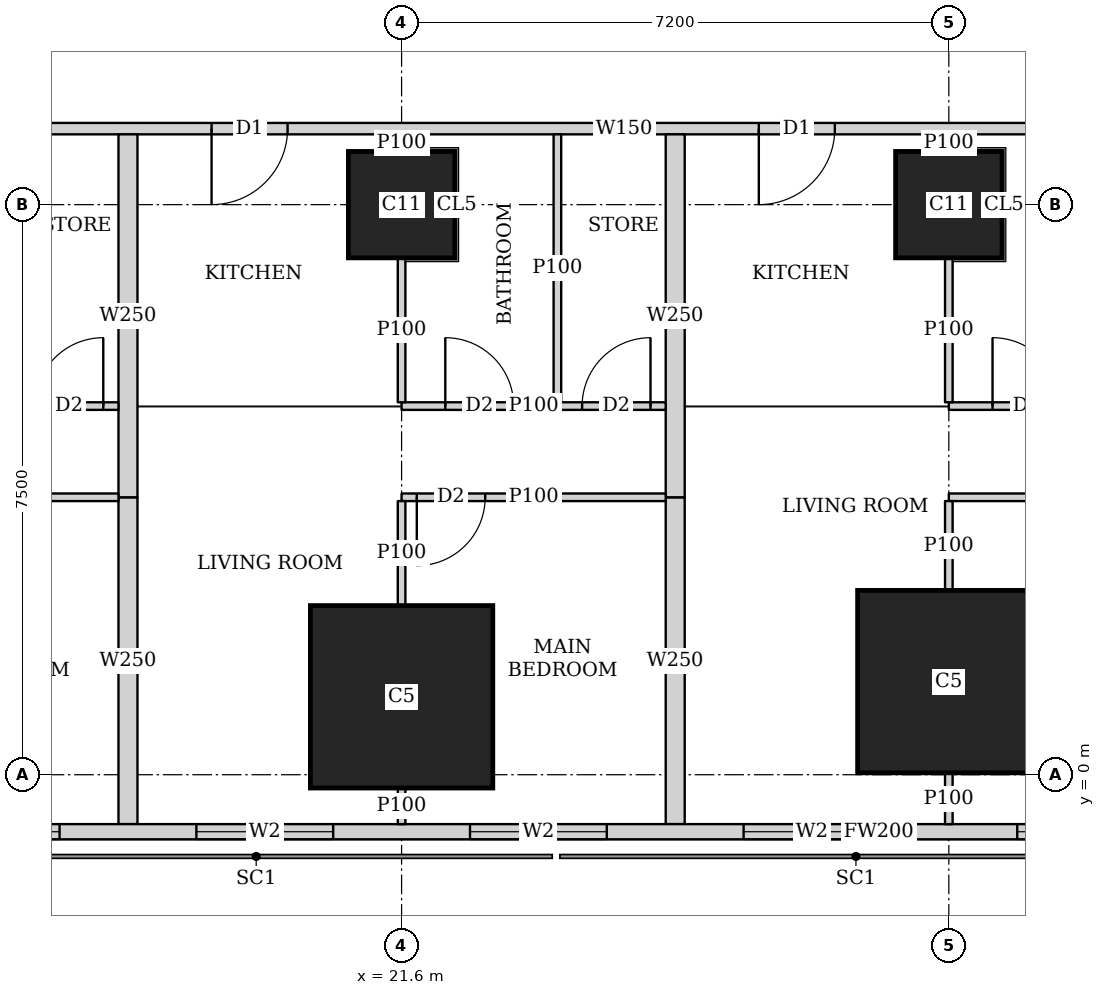
"""IFC4 building model, lengths in metres.
Left out: names, types, materials, properties, quantities, classifications, styles, units other than length and angle.
Written with IfcOpenShell. Run it as: python <this file> out.ifc"""

import sys

from ifc_helpers import new_model, si_unit, direction, frame, frame_2d, origin, origin_2d, place, context, subcontext, project, spatial, rectangle, extrude, element, fill, save


model = new_model("IFC4")
c1 = context("Model", 3, precision=1e-05, world=origin(), true_north=direction((0.0, 1.0)))
c2 = subcontext(c1, "Body", "Model", "MODEL_VIEW")
j1 = project(units=[si_unit("LENGTHUNIT", "METRE"), si_unit("PLANEANGLEUNIT", "RADIAN")], contexts=[c1])
p1 = place(None, origin())
s1 = spatial("IfcSite", under=j1, at=p1, CompositionType="ELEMENT")
p2 = place(p1, origin())
s2 = spatial("IfcBuilding", under=s1, at=p2, CompositionType="ELEMENT")
p3 = place(p2, frame((0.0, 0.0, 212.45)))
s3 = spatial("IfcBuildingStorey", under=s2, at=p3, CompositionType="ELEMENT", Elevation=212.45)
for number, where, z_axis, x_axis in (
    (1, (21.6, 1.025, 0.0), (0.0, 0.0, 1.0), (1.0, 0.0, 0.0)),
    (2, (28.8, 1.225, 0.0), (0.0, 0.0, 1.0), (1.0, 0.0, 0.0)),
):
    element("IfcColumn", number, at=place(p3, frame(where, z_axis=z_axis, x_axis=x_axis)), inside=s3, PredefinedType="COLUMN", context=c2, shape_type="SweptSolid", body=[
        extrude(rectangle(XDim=2.4, YDim=2.4, at=origin_2d()), origin(), (0.0, 0.0, 1.0), 3.75),
    ])
for number, where, z_axis, x_axis in (
    (3, (21.6, 7.5, 0.0), (0.0, 0.0, 1.0), (1.0, 0.0, 0.0)),
    (4, (28.8, 7.5, 0.0), (0.0, 0.0, 1.0), (1.0, 0.0, 0.0)),
):
    element("IfcColumn", number, at=place(p3, frame(where, z_axis=z_axis, x_axis=x_axis)), inside=s3, PredefinedType="COLUMN", context=c2, shape_type="SweptSolid", body=[
        extrude(rectangle(XDim=1.4, YDim=1.4, at=origin_2d()), origin(), (0.0, 0.0, 1.0), 3.75),
    ])
p4 = place(p3, frame((7.363, -0.75, 0.0), z_axis=(0.0, 0.0, 1.0), x_axis=(1.0, 0.0, 0.0)))
e5 = element("IfcWall", 5, at=p4, inside=s3, PredefinedType="SOLIDWALL", context=c2, shape_type="SweptSolid", body=[
    extrude(rectangle(XDim=40.428, YDim=0.2, at=frame_2d((20.214, 0.0))), origin(), (0.0, 0.0, 1.0), 3.5),
])
p5 = place(p4, frame((2.319, 0.0, 0.9)))
e6 = element("IfcOpeningElement", 6, at=p5, cuts=e5, PredefinedType="OPENING", context=c2, shape_type="SweptSolid", body=[
    extrude(rectangle(XDim=2.4, YDim=1.5, at=frame_2d((1.2, 0.75))), frame((0.0, 0.11, 0.0), z_axis=(0.0, -1.0, 0.0), x_axis=(1.0, 0.0, 0.0)), (0.0, 0.0, 1.0), 0.22),
])
p6 = place(p4, frame((7.937, 0.0, 0.9)))
e7 = element("IfcOpeningElement", 7, at=p6, cuts=e5, PredefinedType="OPENING", context=c2, shape_type="SweptSolid", body=[
    extrude(rectangle(XDim=1.8, YDim=1.5, at=frame_2d((0.9, 0.75))), frame((0.0, 0.11, 0.0), z_axis=(0.0, -1.0, 0.0), x_axis=(1.0, 0.0, 0.0)), (0.0, 0.0, 1.0), 0.22),
])
p7 = place(p4, frame((11.537, 0.0, 0.9)))
e8 = element("IfcOpeningElement", 8, at=p7, cuts=e5, PredefinedType="OPENING", context=c2, shape_type="SweptSolid", body=[
    extrude(rectangle(XDim=1.8, YDim=1.5, at=frame_2d((0.9, 0.75))), frame((0.0, 0.11, 0.0), z_axis=(0.0, -1.0, 0.0), x_axis=(1.0, 0.0, 0.0)), (0.0, 0.0, 1.0), 0.22),
])
p8 = place(p4, frame((15.137, 0.0, 0.9)))
e9 = element("IfcOpeningElement", 9, at=p8, cuts=e5, PredefinedType="OPENING", context=c2, shape_type="SweptSolid", body=[
    extrude(rectangle(XDim=1.8, YDim=1.5, at=frame_2d((0.9, 0.75))), frame((0.0, 0.11, 0.0), z_axis=(0.0, -1.0, 0.0), x_axis=(1.0, 0.0, 0.0)), (0.0, 0.0, 1.0), 0.22),
])
p9 = place(p4, frame((18.737, 0.0, 0.9)))
e10 = element("IfcOpeningElement", 10, at=p9, cuts=e5, PredefinedType="OPENING", context=c2, shape_type="SweptSolid", body=[
    extrude(rectangle(XDim=1.8, YDim=1.5, at=frame_2d((0.9, 0.75))), frame((0.0, 0.11, 0.0), z_axis=(0.0, -1.0, 0.0), x_axis=(1.0, 0.0, 0.0)), (0.0, 0.0, 1.0), 0.22),
])
p10 = place(p4, frame((22.337, 0.0, 0.9)))
e11 = element("IfcOpeningElement", 11, at=p10, cuts=e5, PredefinedType="OPENING", context=c2, shape_type="SweptSolid", body=[
    extrude(rectangle(XDim=1.8, YDim=1.5, at=frame_2d((0.9, 0.75))), frame((0.0, 0.11, 0.0), z_axis=(0.0, -1.0, 0.0), x_axis=(1.0, 0.0, 0.0)), (0.0, 0.0, 1.0), 0.22),
])
p11 = place(p4, frame((25.937, 0.0, 0.9)))
e12 = element("IfcOpeningElement", 12, at=p11, cuts=e5, PredefinedType="OPENING", context=c2, shape_type="SweptSolid", body=[
    extrude(rectangle(XDim=1.8, YDim=1.5, at=frame_2d((0.9, 0.75))), frame((0.0, 0.11, 0.0), z_axis=(0.0, -1.0, 0.0), x_axis=(1.0, 0.0, 0.0)), (0.0, 0.0, 1.0), 0.22),
])
p12 = place(p4, frame((29.537, 0.0, 0.9)))
e13 = element("IfcOpeningElement", 13, at=p12, cuts=e5, PredefinedType="OPENING", context=c2, shape_type="SweptSolid", body=[
    extrude(rectangle(XDim=1.8, YDim=1.5, at=frame_2d((0.9, 0.75))), frame((0.0, 0.11, 0.0), z_axis=(0.0, -1.0, 0.0), x_axis=(1.0, 0.0, 0.0)), (0.0, 0.0, 1.0), 0.22),
])
p13 = place(p3, frame((40.053, 8.5, 0.0), z_axis=(0.0, 0.0, 1.0), x_axis=(-1.0, 0.0, 0.0)))
e14 = element("IfcWall", 14, at=p13, inside=s3, PredefinedType="SOLIDWALL", context=c2, shape_type="SweptSolid", body=[
    extrude(rectangle(XDim=31.052, YDim=0.15, at=frame_2d((15.526, 0.0))), origin(), (0.0, 0.0, 1.0), 3.5),
])
p14 = place(p13, frame((29.178, 0.0, 0.0)))
e15 = element("IfcOpeningElement", 15, at=p14, cuts=e14, PredefinedType="OPENING", context=c2, shape_type="SweptSolid", body=[
    extrude(rectangle(XDim=1.0, YDim=2.1, at=frame_2d((0.5, 1.05))), frame((0.0, 0.085, 0.0), z_axis=(0.0, -1.0, 0.0), x_axis=(1.0, 0.0, 0.0)), (0.0, 0.0, 1.0), 0.17),
])
p15 = place(p13, frame((19.953, 0.0, 0.0)))
e16 = element("IfcOpeningElement", 16, at=p15, cuts=e14, PredefinedType="OPENING", context=c2, shape_type="SweptSolid", body=[
    extrude(rectangle(XDim=1.0, YDim=2.1, at=frame_2d((0.5, 1.05))), frame((0.0, 0.085, 0.0), z_axis=(0.0, -1.0, 0.0), x_axis=(1.0, 0.0, 0.0)), (0.0, 0.0, 1.0), 0.17),
])
p16 = place(p13, frame((12.753, 0.0, 0.0)))
e17 = element("IfcOpeningElement", 17, at=p16, cuts=e14, PredefinedType="OPENING", context=c2, shape_type="SweptSolid", body=[
    extrude(rectangle(XDim=1.0, YDim=2.1, at=frame_2d((0.5, 1.05))), frame((0.0, 0.085, 0.0), z_axis=(0.0, -1.0, 0.0), x_axis=(1.0, 0.0, 0.0)), (0.0, 0.0, 1.0), 0.17),
])
p17 = place(p13, frame((0.15, 0.0, 0.0)))
e18 = element("IfcOpeningElement", 18, at=p17, cuts=e14, PredefinedType="OPENING", context=c2, shape_type="SweptSolid", body=[
    extrude(rectangle(XDim=1.0, YDim=2.1, at=frame_2d((0.5, 1.05))), frame((0.0, 0.085, 0.0), z_axis=(0.0, -1.0, 0.0), x_axis=(1.0, 0.0, 0.0)), (0.0, 0.0, 1.0), 0.17),
])
p18 = place(p3, frame((17.875, 3.65, 0.0), z_axis=(0.0, 0.0, 1.0), x_axis=(-1.0, 0.0, 0.0)))
e19 = element("IfcWall", 19, at=p18, inside=s3, PredefinedType="PARTITIONING", context=c2, shape_type="SweptSolid", body=[
    extrude(rectangle(XDim=3.475, YDim=0.1, at=frame_2d((1.738, 0.0))), origin(), (0.0, 0.0, 1.0), 3.5),
])
p19 = place(p18, frame((1.35, 0.0, 0.0)))
e20 = element("IfcOpeningElement", 20, at=p19, cuts=e19, PredefinedType="OPENING", context=c2, shape_type="SweptSolid", body=[
    extrude(rectangle(XDim=0.9, YDim=2.1, at=frame_2d((0.45, 1.05))), frame((0.0, 0.06, 0.0), z_axis=(0.0, -1.0, 0.0), x_axis=(1.0, 0.0, 0.0)), (0.0, 0.0, 1.0), 0.12),
])
p20 = place(p3, frame((17.875, 4.85, 0.0), z_axis=(0.0, 0.0, 1.0), x_axis=(-1.0, 0.0, 0.0)))
e21 = element("IfcWall", 21, at=p20, inside=s3, PredefinedType="PARTITIONING", context=c2, shape_type="SweptSolid", body=[
    extrude(rectangle(XDim=3.475, YDim=0.1, at=frame_2d((1.738, 0.0))), origin(), (0.0, 0.0, 1.0), 3.5),
])
p21 = place(p20, frame((2.0, 0.0, 0.0)))
e22 = element("IfcOpeningElement", 22, at=p21, cuts=e21, PredefinedType="OPENING", context=c2, shape_type="SweptSolid", body=[
    extrude(rectangle(XDim=0.9, YDim=2.1, at=frame_2d((0.45, 1.05))), frame((0.0, 0.06, 0.0), z_axis=(0.0, -1.0, 0.0), x_axis=(1.0, 0.0, 0.0)), (0.0, 0.0, 1.0), 0.12),
])
p22 = place(p20, frame((0.2, 0.0, 0.0)))
e23 = element("IfcOpeningElement", 23, at=p22, cuts=e21, PredefinedType="OPENING", context=c2, shape_type="SweptSolid", body=[
    extrude(rectangle(XDim=0.9, YDim=2.1, at=frame_2d((0.45, 1.05))), frame((0.0, 0.06, 0.0), z_axis=(0.0, -1.0, 0.0), x_axis=(1.0, 0.0, 0.0)), (0.0, 0.0, 1.0), 0.12),
])
p23 = place(p3, frame((25.075, 3.65, 0.0), z_axis=(0.0, 0.0, 1.0), x_axis=(-1.0, 0.0, 0.0)))
e24 = element("IfcWall", 24, at=p23, inside=s3, PredefinedType="PARTITIONING", context=c2, shape_type="SweptSolid", body=[
    extrude(rectangle(XDim=3.475, YDim=0.1, at=frame_2d((1.737, 0.0))), origin(), (0.0, 0.0, 1.0), 3.5),
])
p24 = place(p23, frame((2.375, 0.0, 0.0)))
e25 = element("IfcOpeningElement", 25, at=p24, cuts=e24, PredefinedType="OPENING", context=c2, shape_type="SweptSolid", body=[
    extrude(rectangle(XDim=0.9, YDim=2.1, at=frame_2d((0.45, 1.05))), frame((0.0, 0.06, 0.0), z_axis=(0.0, -1.0, 0.0), x_axis=(1.0, 0.0, 0.0)), (0.0, 0.0, 1.0), 0.12),
])
p25 = place(p3, frame((25.075, 4.85, 0.0), z_axis=(0.0, 0.0, 1.0), x_axis=(-1.0, 0.0, 0.0)))
e26 = element("IfcWall", 26, at=p25, inside=s3, PredefinedType="PARTITIONING", context=c2, shape_type="SweptSolid", body=[
    extrude(rectangle(XDim=3.475, YDim=0.1, at=frame_2d((1.737, 0.0))), origin(), (0.0, 0.0, 1.0), 3.5),
])
p26 = place(p25, frame((2.0, 0.0, 0.0)))
e27 = element("IfcOpeningElement", 27, at=p26, cuts=e26, PredefinedType="OPENING", context=c2, shape_type="SweptSolid", body=[
    extrude(rectangle(XDim=0.9, YDim=2.1, at=frame_2d((0.45, 1.05))), frame((0.0, 0.06, 0.0), z_axis=(0.0, -1.0, 0.0), x_axis=(1.0, 0.0, 0.0)), (0.0, 0.0, 1.0), 0.12),
])
p27 = place(p25, frame((0.2, 0.0, 0.0)))
e28 = element("IfcOpeningElement", 28, at=p27, cuts=e26, PredefinedType="OPENING", context=c2, shape_type="SweptSolid", body=[
    extrude(rectangle(XDim=0.9, YDim=2.1, at=frame_2d((0.45, 1.05))), frame((0.0, 0.06, 0.0), z_axis=(0.0, -1.0, 0.0), x_axis=(1.0, 0.0, 0.0)), (0.0, 0.0, 1.0), 0.12),
])
p28 = place(p3, frame((21.6, -0.65, 0.0), z_axis=(0.0, 0.0, 1.0), x_axis=(0.0, 1.0, 0.0)))
e29 = element("IfcWall", 29, at=p28, inside=s3, PredefinedType="PARTITIONING", context=c2, shape_type="SweptSolid", body=[
    extrude(rectangle(XDim=0.474, YDim=0.1, at=frame_2d((0.237, 0.0))), origin(), (0.0, 0.0, 1.0), 3.5),
])
p29 = place(p3, frame((21.6, 2.226, 0.0), z_axis=(0.0, 0.0, 1.0), x_axis=(0.0, 1.0, 0.0)))
e30 = element("IfcWall", 30, at=p29, inside=s3, PredefinedType="PARTITIONING", context=c2, shape_type="SweptSolid", body=[
    extrude(rectangle(XDim=1.374, YDim=0.1, at=frame_2d((0.687, 0.0))), origin(), (0.0, 0.0, 1.0), 3.5),
])
p30 = place(p3, frame((21.6, 4.9, 0.0), z_axis=(0.0, 0.0, 1.0), x_axis=(0.0, 1.0, 0.0)))
e31 = element("IfcWall", 31, at=p30, inside=s3, PredefinedType="PARTITIONING", context=c2, shape_type="SweptSolid", body=[
    extrude(rectangle(XDim=1.899, YDim=0.1, at=frame_2d((0.95, 0.0))), origin(), (0.0, 0.0, 1.0), 3.5),
])
p31 = place(p3, frame((21.6, 8.201, 0.0), z_axis=(0.0, 0.0, 1.0), x_axis=(0.0, 1.0, 0.0)))
e32 = element("IfcWall", 32, at=p31, inside=s3, PredefinedType="PARTITIONING", context=c2, shape_type="SweptSolid", body=[
    extrude(rectangle(XDim=0.224, YDim=0.1, at=frame_2d((0.112, 0.0))), origin(), (0.0, 0.0, 1.0), 3.5),
])
p32 = place(p3, frame((23.65, 4.9, 0.0), z_axis=(0.0, 0.0, 1.0), x_axis=(0.0, 1.0, 0.0)))
e33 = element("IfcWall", 33, at=p32, inside=s3, PredefinedType="PARTITIONING", context=c2, shape_type="SweptSolid", body=[
    extrude(rectangle(XDim=3.525, YDim=0.1, at=frame_2d((1.763, 0.0))), origin(), (0.0, 0.0, 1.0), 3.5),
])
p33 = place(p3, frame((18.0, -0.65, 0.0), z_axis=(0.0, 0.0, 1.0), x_axis=(0.0, 1.0, 0.0)))
e34 = element("IfcWall", 34, at=p33, inside=s3, PredefinedType="SOLIDWALL", context=c2, shape_type="SweptSolid", body=[
    extrude(rectangle(XDim=4.3, YDim=0.25, at=frame_2d((2.15, 0.0))), origin(), (0.0, 0.0, 1.0), 2.05),
])
p34 = place(p3, frame((18.0, 3.65, 0.0), z_axis=(0.0, 0.0, 1.0), x_axis=(0.0, 1.0, 0.0)))
e35 = element("IfcWall", 35, at=p34, inside=s3, PredefinedType="SOLIDWALL", context=c2, shape_type="SweptSolid", body=[
    extrude(rectangle(XDim=4.775, YDim=0.25, at=frame_2d((2.388, 0.0))), origin(), (0.0, 0.0, 1.0), 3.5),
])
p35 = place(p3, frame((35.875, 3.65, 0.0), z_axis=(0.0, 0.0, 1.0), x_axis=(-1.0, 0.0, 0.0)))
e36 = element("IfcWall", 36, at=p35, inside=s3, PredefinedType="PARTITIONING", context=c2, shape_type="SweptSolid", body=[
    extrude(rectangle(XDim=7.075, YDim=0.1, at=frame_2d((3.538, 0.0))), origin(), (0.0, 0.0, 1.0), 3.5),
])
p36 = place(p35, frame((4.95, 0.0, 0.0)))
e37 = element("IfcOpeningElement", 37, at=p36, cuts=e36, PredefinedType="OPENING", context=c2, shape_type="SweptSolid", body=[
    extrude(rectangle(XDim=0.9, YDim=2.1, at=frame_2d((0.45, 1.05))), frame((0.0, 0.06, 0.0), z_axis=(0.0, -1.0, 0.0), x_axis=(1.0, 0.0, 0.0)), (0.0, 0.0, 1.0), 0.12),
])
p37 = place(p35, frame((2.375, 0.0, 0.0)))
e38 = element("IfcOpeningElement", 38, at=p37, cuts=e36, PredefinedType="OPENING", context=c2, shape_type="SweptSolid", body=[
    extrude(rectangle(XDim=0.9, YDim=2.1, at=frame_2d((0.45, 1.05))), frame((0.0, 0.06, 0.0), z_axis=(0.0, -1.0, 0.0), x_axis=(1.0, 0.0, 0.0)), (0.0, 0.0, 1.0), 0.12),
])
p38 = place(p3, frame((35.875, 4.85, 0.0), z_axis=(0.0, 0.0, 1.0), x_axis=(-1.0, 0.0, 0.0)))
e39 = element("IfcWall", 39, at=p38, inside=s3, PredefinedType="PARTITIONING", context=c2, shape_type="SweptSolid", body=[
    extrude(rectangle(XDim=7.075, YDim=0.1, at=frame_2d((3.538, 0.0))), origin(), (0.0, 0.0, 1.0), 3.5),
])
p39 = place(p38, frame((5.6, 0.0, 0.0)))
e40 = element("IfcOpeningElement", 40, at=p39, cuts=e39, PredefinedType="OPENING", context=c2, shape_type="SweptSolid", body=[
    extrude(rectangle(XDim=0.9, YDim=2.1, at=frame_2d((0.45, 1.05))), frame((0.0, 0.06, 0.0), z_axis=(0.0, -1.0, 0.0), x_axis=(1.0, 0.0, 0.0)), (0.0, 0.0, 1.0), 0.12),
])
p40 = place(p38, frame((2.225, 0.0, 0.0)))
e41 = element("IfcOpeningElement", 41, at=p40, cuts=e39, PredefinedType="OPENING", context=c2, shape_type="SweptSolid", body=[
    extrude(rectangle(XDim=0.9, YDim=2.1, at=frame_2d((0.45, 1.05))), frame((0.0, 0.06, 0.0), z_axis=(0.0, -1.0, 0.0), x_axis=(1.0, 0.0, 0.0)), (0.0, 0.0, 1.0), 0.12),
])
p41 = place(p38, frame((3.8, 0.0, 0.0)))
e42 = element("IfcOpeningElement", 42, at=p41, cuts=e39, PredefinedType="OPENING", context=c2, shape_type="SweptSolid", body=[
    extrude(rectangle(XDim=0.9, YDim=2.1, at=frame_2d((0.45, 1.05))), frame((0.0, 0.06, 0.0), z_axis=(0.0, -1.0, 0.0), x_axis=(1.0, 0.0, 0.0)), (0.0, 0.0, 1.0), 0.12),
])
p42 = place(p38, frame((0.425, 0.0, 0.0)))
e43 = element("IfcOpeningElement", 43, at=p42, cuts=e39, PredefinedType="OPENING", context=c2, shape_type="SweptSolid", body=[
    extrude(rectangle(XDim=0.9, YDim=2.1, at=frame_2d((0.45, 1.05))), frame((0.0, 0.06, 0.0), z_axis=(0.0, -1.0, 0.0), x_axis=(1.0, 0.0, 0.0)), (0.0, 0.0, 1.0), 0.12),
])
p43 = place(p3, frame((28.8, -0.65, 0.0), z_axis=(0.0, 0.0, 1.0), x_axis=(0.0, 1.0, 0.0)))
e44 = element("IfcWall", 44, at=p43, inside=s3, PredefinedType="PARTITIONING", context=c2, shape_type="SweptSolid", body=[
    extrude(rectangle(XDim=0.674, YDim=0.1, at=frame_2d((0.337, 0.0))), origin(), (0.0, 0.0, 1.0), 3.5),
])
p44 = place(p3, frame((28.8, 2.426, 0.0), z_axis=(0.0, 0.0, 1.0), x_axis=(0.0, 1.0, 0.0)))
e45 = element("IfcWall", 45, at=p44, inside=s3, PredefinedType="PARTITIONING", context=c2, shape_type="SweptSolid", body=[
    extrude(rectangle(XDim=1.174, YDim=0.1, at=frame_2d((0.587, 0.0))), origin(), (0.0, 0.0, 1.0), 3.5),
])
p45 = place(p3, frame((28.8, 4.9, 0.0), z_axis=(0.0, 0.0, 1.0), x_axis=(0.0, 1.0, 0.0)))
e46 = element("IfcWall", 46, at=p45, inside=s3, PredefinedType="PARTITIONING", context=c2, shape_type="SweptSolid", body=[
    extrude(rectangle(XDim=1.899, YDim=0.1, at=frame_2d((0.95, 0.0))), origin(), (0.0, 0.0, 1.0), 3.5),
])
p46 = place(p3, frame((28.8, 8.201, 0.0), z_axis=(0.0, 0.0, 1.0), x_axis=(0.0, 1.0, 0.0)))
e47 = element("IfcWall", 47, at=p46, inside=s3, PredefinedType="PARTITIONING", context=c2, shape_type="SweptSolid", body=[
    extrude(rectangle(XDim=0.224, YDim=0.1, at=frame_2d((0.112, 0.0))), origin(), (0.0, 0.0, 1.0), 3.5),
])
p47 = place(p3, frame((25.2, -0.65, 0.0), z_axis=(0.0, 0.0, 1.0), x_axis=(0.0, 1.0, 0.0)))
e48 = element("IfcWall", 48, at=p47, inside=s3, PredefinedType="SOLIDWALL", context=c2, shape_type="SweptSolid", body=[
    extrude(rectangle(XDim=4.3, YDim=0.25, at=frame_2d((2.15, 0.0))), origin(), (0.0, 0.0, 1.0), 2.05),
])
p48 = place(p3, frame((25.2, 3.65, 0.0), z_axis=(0.0, 0.0, 1.0), x_axis=(0.0, 1.0, 0.0)))
e49 = element("IfcWall", 49, at=p48, inside=s3, PredefinedType="SOLIDWALL", context=c2, shape_type="SweptSolid", body=[
    extrude(rectangle(XDim=4.775, YDim=0.25, at=frame_2d((2.388, 0.0))), origin(), (0.0, 0.0, 1.0), 3.5),
])
p49 = place(p6, origin())
e50 = element("IfcWindow", 50, at=p49, inside=s3, PartitioningType="SINGLE_PANEL", PredefinedType="WINDOW", context=c2, shape_type="SweptSolid", body=[
    extrude(rectangle(XDim=1.8, YDim=1.5, at=frame_2d((0.9, 0.75))), frame((0.0, 0.03, 0.0), z_axis=(0.0, -1.0, 0.0), x_axis=(1.0, 0.0, 0.0)), (0.0, 0.0, 1.0), 0.06),
])
fill(e7, e50)
p50 = place(p7, origin())
e51 = element("IfcWindow", 51, at=p50, inside=s3, PartitioningType="SINGLE_PANEL", PredefinedType="WINDOW", context=c2, shape_type="SweptSolid", body=[
    extrude(rectangle(XDim=1.8, YDim=1.5, at=frame_2d((0.9, 0.75))), frame((0.0, 0.03, 0.0), z_axis=(0.0, -1.0, 0.0), x_axis=(1.0, 0.0, 0.0)), (0.0, 0.0, 1.0), 0.06),
])
fill(e8, e51)
p51 = place(p8, origin())
e52 = element("IfcWindow", 52, at=p51, inside=s3, PartitioningType="SINGLE_PANEL", PredefinedType="WINDOW", context=c2, shape_type="SweptSolid", body=[
    extrude(rectangle(XDim=1.8, YDim=1.5, at=frame_2d((0.9, 0.75))), frame((0.0, 0.03, 0.0), z_axis=(0.0, -1.0, 0.0), x_axis=(1.0, 0.0, 0.0)), (0.0, 0.0, 1.0), 0.06),
])
fill(e9, e52)
p52 = place(p9, origin())
e53 = element("IfcWindow", 53, at=p52, inside=s3, PartitioningType="SINGLE_PANEL", PredefinedType="WINDOW", context=c2, shape_type="SweptSolid", body=[
    extrude(rectangle(XDim=1.8, YDim=1.5, at=frame_2d((0.9, 0.75))), frame((0.0, 0.03, 0.0), z_axis=(0.0, -1.0, 0.0), x_axis=(1.0, 0.0, 0.0)), (0.0, 0.0, 1.0), 0.06),
])
fill(e10, e53)
p53 = place(p10, origin())
e54 = element("IfcWindow", 54, at=p53, inside=s3, PartitioningType="SINGLE_PANEL", PredefinedType="WINDOW", context=c2, shape_type="SweptSolid", body=[
    extrude(rectangle(XDim=1.8, YDim=1.5, at=frame_2d((0.9, 0.75))), frame((0.0, 0.03, 0.0), z_axis=(0.0, -1.0, 0.0), x_axis=(1.0, 0.0, 0.0)), (0.0, 0.0, 1.0), 0.06),
])
fill(e11, e54)
p54 = place(p22, origin())
e55 = element("IfcDoor", 55, at=p54, inside=s3, OperationType="SINGLE_SWING_RIGHT", PredefinedType="DOOR", context=c2, shape_type="SweptSolid", body=[
    extrude(rectangle(XDim=0.9, YDim=2.1, at=frame_2d((0.45, 1.05))), frame((0.0, 0.025, 0.0), z_axis=(0.0, -1.0, 0.0), x_axis=(1.0, 0.0, 0.0)), (0.0, 0.0, 1.0), 0.05),
])
fill(e23, e55)
p55 = place(p24, origin())
e56 = element("IfcDoor", 56, at=p55, inside=s3, OperationType="SINGLE_SWING_RIGHT", PredefinedType="DOOR", context=c2, shape_type="SweptSolid", body=[
    extrude(rectangle(XDim=0.9, YDim=2.1, at=frame_2d((0.45, 1.05))), frame((0.0, 0.025, 0.0), z_axis=(0.0, -1.0, 0.0), x_axis=(1.0, 0.0, 0.0)), (0.0, 0.0, 1.0), 0.05),
])
fill(e25, e56)
p56 = place(p26, origin())
e57 = element("IfcDoor", 57, at=p56, inside=s3, OperationType="SINGLE_SWING_LEFT", PredefinedType="DOOR", context=c2, shape_type="SweptSolid", body=[
    extrude(rectangle(XDim=0.9, YDim=2.1, at=frame_2d((0.45, 1.05))), frame((0.0, 0.025, 0.0), z_axis=(0.0, -1.0, 0.0), x_axis=(1.0, 0.0, 0.0)), (0.0, 0.0, 1.0), 0.05),
])
fill(e27, e57)
p57 = place(p27, origin())
e58 = element("IfcDoor", 58, at=p57, inside=s3, OperationType="SINGLE_SWING_RIGHT", PredefinedType="DOOR", context=c2, shape_type="SweptSolid", body=[
    extrude(rectangle(XDim=0.9, YDim=2.1, at=frame_2d((0.45, 1.05))), frame((0.0, 0.025, 0.0), z_axis=(0.0, -1.0, 0.0), x_axis=(1.0, 0.0, 0.0)), (0.0, 0.0, 1.0), 0.05),
])
fill(e28, e58)
p58 = place(p15, origin())
e59 = element("IfcDoor", 59, at=p58, inside=s3, OperationType="SINGLE_SWING_RIGHT", PredefinedType="DOOR", context=c2, shape_type="SweptSolid", body=[
    extrude(rectangle(XDim=1.0, YDim=2.1, at=frame_2d((0.5, 1.05))), frame((0.0, 0.025, 0.0), z_axis=(0.0, -1.0, 0.0), x_axis=(1.0, 0.0, 0.0)), (0.0, 0.0, 1.0), 0.05),
])
fill(e16, e59)
p59 = place(p39, origin())
e60 = element("IfcDoor", 60, at=p59, inside=s3, OperationType="SINGLE_SWING_LEFT", PredefinedType="DOOR", context=c2, shape_type="SweptSolid", body=[
    extrude(rectangle(XDim=0.9, YDim=2.1, at=frame_2d((0.45, 1.05))), frame((0.0, 0.025, 0.0), z_axis=(0.0, -1.0, 0.0), x_axis=(1.0, 0.0, 0.0)), (0.0, 0.0, 1.0), 0.05),
])
fill(e40, e60)
p60 = place(p16, origin())
e61 = element("IfcDoor", 61, at=p60, inside=s3, OperationType="SINGLE_SWING_RIGHT", PredefinedType="DOOR", context=c2, shape_type="SweptSolid", body=[
    extrude(rectangle(XDim=1.0, YDim=2.1, at=frame_2d((0.5, 1.05))), frame((0.0, 0.025, 0.0), z_axis=(0.0, -1.0, 0.0), x_axis=(1.0, 0.0, 0.0)), (0.0, 0.0, 1.0), 0.05),
])
fill(e17, e61)
save(model, sys.argv[1])
